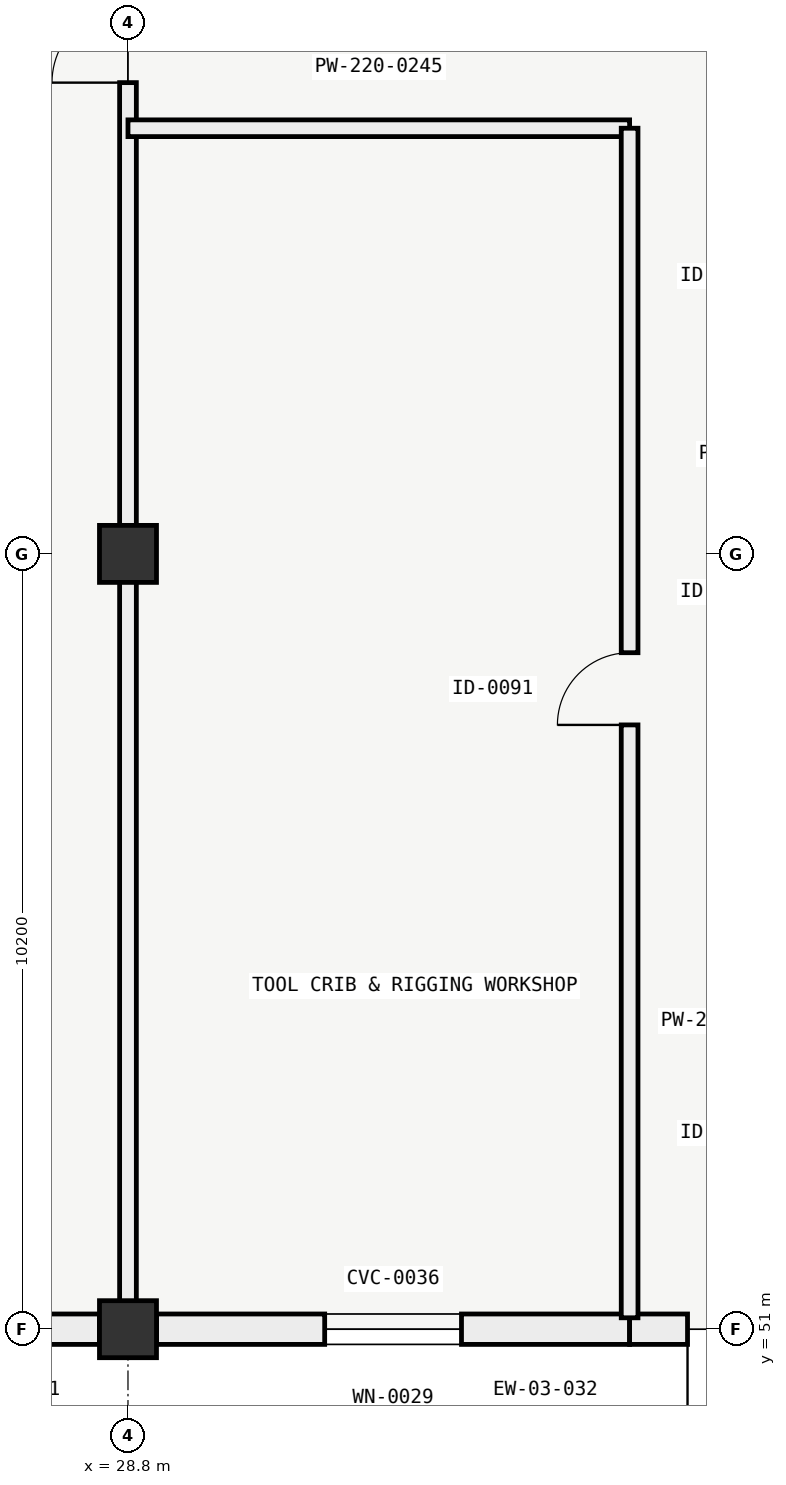
"""IFC4 building model, lengths in metres.
Left out: names, types, materials, properties, quantities, classifications, styles, units other than length and angle.
Written with IfcOpenShell. Run it as: python <this file> out.ifc"""

import sys

from ifc_helpers import new_model, si_unit, direction, frame, frame_2d, origin, origin_2d, place, context, subcontext, project, spatial, rectangle, extrude, element, fill, save


model = new_model("IFC4")
c1 = context("Model", 3, precision=1e-05, world=origin(), true_north=direction((0.0, 1.0)))
c2 = subcontext(c1, "Body", "Model", "MODEL_VIEW")
j1 = project(units=[si_unit("LENGTHUNIT", "METRE"), si_unit("PLANEANGLEUNIT", "RADIAN")], contexts=[c1])
p1 = place(None, origin())
s1 = spatial("IfcSite", under=j1, at=p1, CompositionType="ELEMENT")
p2 = place(p1, origin())
s2 = spatial("IfcBuilding", under=s1, at=p2, CompositionType="ELEMENT")
p3 = place(p2, origin())
s3 = spatial("IfcBuildingStorey", under=s2, at=p3, CompositionType="ELEMENT", Elevation=0.0)
for number, where, z_axis, x_axis in (
    (1, (28.8, 51.0, 0.0), (0.0, 0.0, 1.0), (1.0, 0.0, 0.0)),
    (2, (28.8, 61.2, 0.0), (0.0, 0.0, 1.0), (1.0, 0.0, 0.0)),
):
    element("IfcColumn", number, at=place(p3, frame(where, z_axis=z_axis, x_axis=x_axis)), inside=s3, PredefinedType="COLUMN", context=c2, shape_type="SweptSolid", body=[
        extrude(rectangle(XDim=0.75, YDim=0.75, at=origin_2d()), origin(), (0.0, 0.0, 1.0), 5.4),
    ])
p4 = place(p3, frame((28.424, 51.0, 0.0), z_axis=(0.0, 0.0, 1.0), x_axis=(-1.0, 0.0, 0.0)))
e3 = element("IfcWall", 3, at=p4, inside=s3, PredefinedType="SOLIDWALL", context=c2, shape_type="SweptSolid", body=[
    extrude(rectangle(XDim=9.224, YDim=0.4, at=frame_2d((4.612, 0.0))), origin(), (0.0, 0.0, 1.0), 3.7),
])
p5 = place(p4, frame((6.024, 0.0, 0.55)))
e4 = element("IfcOpeningElement", 4, at=p5, cuts=e3, PredefinedType="OPENING", context=c2, shape_type="SweptSolid", body=[
    extrude(rectangle(XDim=2.0, YDim=1.35, at=frame_2d((1.0, 0.675))), frame((0.0, 0.21, 0.0), z_axis=(0.0, -1.0, 0.0), x_axis=(1.0, 0.0, 0.0)), (0.0, 0.0, 1.0), 0.42),
])
p6 = place(p4, frame((2.424, 0.0, 0.55)))
e5 = element("IfcOpeningElement", 5, at=p6, cuts=e3, PredefinedType="OPENING", context=c2, shape_type="SweptSolid", body=[
    extrude(rectangle(XDim=2.0, YDim=1.35, at=frame_2d((1.0, 0.675))), frame((0.0, 0.21, 0.0), z_axis=(0.0, -1.0, 0.0), x_axis=(1.0, 0.0, 0.0)), (0.0, 0.0, 1.0), 0.42),
])
p7 = place(p3, frame((35.4, 51.0, 0.0), z_axis=(0.0, 0.0, 1.0), x_axis=(-1.0, 0.0, 0.0)))
e6 = element("IfcWall", 6, at=p7, inside=s3, PredefinedType="SOLIDWALL", context=c2, shape_type="SweptSolid", body=[
    extrude(rectangle(XDim=6.224, YDim=0.4, at=frame_2d((3.112, 0.0))), origin(), (0.0, 0.0, 1.0), 4.493),
])
p8 = place(p7, frame((2.212, 0.0, 0.9)))
e7 = element("IfcOpeningElement", 7, at=p8, cuts=e6, PredefinedType="OPENING", context=c2, shape_type="SweptSolid", body=[
    extrude(rectangle(XDim=1.8, YDim=2.1, at=frame_2d((0.9, 1.05))), frame((0.0, 0.21, 0.0), z_axis=(0.0, -1.0, 0.0), x_axis=(1.0, 0.0, 0.0)), (0.0, 0.0, 1.0), 0.42),
])
p9 = place(p3, frame((38.024, 51.0, 0.0), z_axis=(0.0, 0.0, 1.0), x_axis=(-1.0, 0.0, 0.0)))
e8 = element("IfcWall", 8, at=p9, inside=s3, PredefinedType="SOLIDWALL", context=c2, shape_type="SweptSolid", body=[
    extrude(rectangle(XDim=2.624, YDim=0.4, at=frame_2d((1.312, 0.0))), origin(), (0.0, 0.0, 1.0), 4.493),
])
p10 = place(p9, frame((0.762, 0.0, 0.0)))
e9 = element("IfcOpeningElement", 9, at=p10, cuts=e8, PredefinedType="OPENING", context=c2, shape_type="SweptSolid", body=[
    extrude(rectangle(XDim=1.1, YDim=2.2, at=frame_2d((0.55, 1.1))), frame((0.0, 0.21, 0.0), z_axis=(0.0, -1.0, 0.0), x_axis=(1.0, 0.0, 0.0)), (0.0, 0.0, 1.0), 0.42),
])
p11 = place(p3, frame((28.8, 51.15, 0.0), z_axis=(0.0, 0.0, 1.0), x_axis=(0.0, 1.0, 0.0)))
e10 = element("IfcWall", 10, at=p11, inside=s3, PredefinedType="PARTITIONING", context=c2, shape_type="SweptSolid", body=[
    extrude(rectangle(XDim=71.1, YDim=0.22, at=frame_2d((35.55, 0.0))), origin(), (0.0, 0.0, 1.0), 3.94),
])
p12 = place(p11, frame((16.25, 0.0, 0.0)))
e11 = element("IfcOpeningElement", 11, at=p12, cuts=e10, PredefinedType="OPENING", context=c2, shape_type="SweptSolid", body=[
    extrude(rectangle(XDim=2.0, YDim=2.4, at=frame_2d((1.0, 1.2))), frame((0.0, 0.12, 0.0), z_axis=(0.0, -1.0, 0.0), x_axis=(1.0, 0.0, 0.0)), (0.0, 0.0, 1.0), 0.24),
])
p13 = place(p11, frame((53.05, 0.0, 0.0)))
e12 = element("IfcOpeningElement", 12, at=p13, cuts=e10, PredefinedType="OPENING", context=c2, shape_type="SweptSolid", body=[
    extrude(rectangle(XDim=2.0, YDim=2.4, at=frame_2d((1.0, 1.2))), frame((0.0, 0.12, 0.0), z_axis=(0.0, -1.0, 0.0), x_axis=(1.0, 0.0, 0.0)), (0.0, 0.0, 1.0), 0.24),
])
p14 = place(p3, frame((28.8, 66.8, 0.0), z_axis=(0.0, 0.0, 1.0), x_axis=(1.0, 0.0, 0.0)))
e13 = element("IfcWall", 13, at=p14, inside=s3, PredefinedType="PARTITIONING", context=c2, shape_type="SweptSolid", body=[
    extrude(rectangle(XDim=6.6, YDim=0.22, at=frame_2d((3.3, 0.0))), origin(), (0.0, 0.0, 1.0), 4.643),
])
p15 = place(p3, frame((35.4, 51.15, 0.0), z_axis=(0.0, 0.0, 1.0), x_axis=(0.0, 1.0, 0.0)))
e14 = element("IfcWall", 14, at=p15, inside=s3, PredefinedType="PARTITIONING", context=c2, shape_type="SweptSolid", body=[
    extrude(rectangle(XDim=15.65, YDim=0.22, at=frame_2d((7.825, 0.0))), origin(), (0.0, 0.0, 1.0), 4.493),
])
p16 = place(p15, frame((7.8, 0.0, 0.0)))
e15 = element("IfcOpeningElement", 15, at=p16, cuts=e14, PredefinedType="OPENING", context=c2, shape_type="SweptSolid", body=[
    extrude(rectangle(XDim=0.95, YDim=2.1, at=frame_2d((0.475, 1.05))), frame((0.0, 0.12, 0.0), z_axis=(0.0, -1.0, 0.0), x_axis=(1.0, 0.0, 0.0)), (0.0, 0.0, 1.0), 0.24),
])
p17 = place(p8, origin())
e16 = element("IfcWindow", 16, at=p17, inside=s3, PartitioningType="SINGLE_PANEL", PredefinedType="WINDOW", context=c2, shape_type="SweptSolid", body=[
    extrude(rectangle(XDim=1.8, YDim=2.1, at=frame_2d((0.9, 1.05))), frame((0.0, 0.03, 0.0), z_axis=(0.0, -1.0, 0.0), x_axis=(1.0, 0.0, 0.0)), (0.0, 0.0, 1.0), 0.06),
])
fill(e7, e16)
p18 = place(p10, origin())
e17 = element("IfcDoor", 17, at=p18, inside=s3, OperationType="SINGLE_SWING_RIGHT", PredefinedType="DOOR", context=c2, shape_type="SweptSolid", body=[
    extrude(rectangle(XDim=1.1, YDim=2.2, at=frame_2d((0.55, 1.1))), frame((0.0, 0.025, 0.0), z_axis=(0.0, -1.0, 0.0), x_axis=(1.0, 0.0, 0.0)), (0.0, 0.0, 1.0), 0.05),
])
fill(e9, e17)
p19 = place(p12, origin())
e18 = element("IfcDoor", 18, at=p19, inside=s3, OperationType="DOUBLE_DOOR_SINGLE_SWING", PredefinedType="DOOR", context=c2, shape_type="SweptSolid", body=[
    extrude(rectangle(XDim=2.0, YDim=2.4, at=frame_2d((1.0, 1.2))), frame((0.0, 0.025, 0.0), z_axis=(0.0, -1.0, 0.0), x_axis=(1.0, 0.0, 0.0)), (0.0, 0.0, 1.0), 0.05),
])
fill(e11, e18)
p20 = place(p16, origin())
e19 = element("IfcDoor", 19, at=p20, inside=s3, OperationType="SINGLE_SWING_LEFT", PredefinedType="DOOR", context=c2, shape_type="SweptSolid", body=[
    extrude(rectangle(XDim=0.95, YDim=2.1, at=frame_2d((0.475, 1.05))), frame((0.0, 0.025, 0.0), z_axis=(0.0, -1.0, 0.0), x_axis=(1.0, 0.0, 0.0)), (0.0, 0.0, 1.0), 0.05),
])
fill(e15, e19)
save(model, sys.argv[1])
